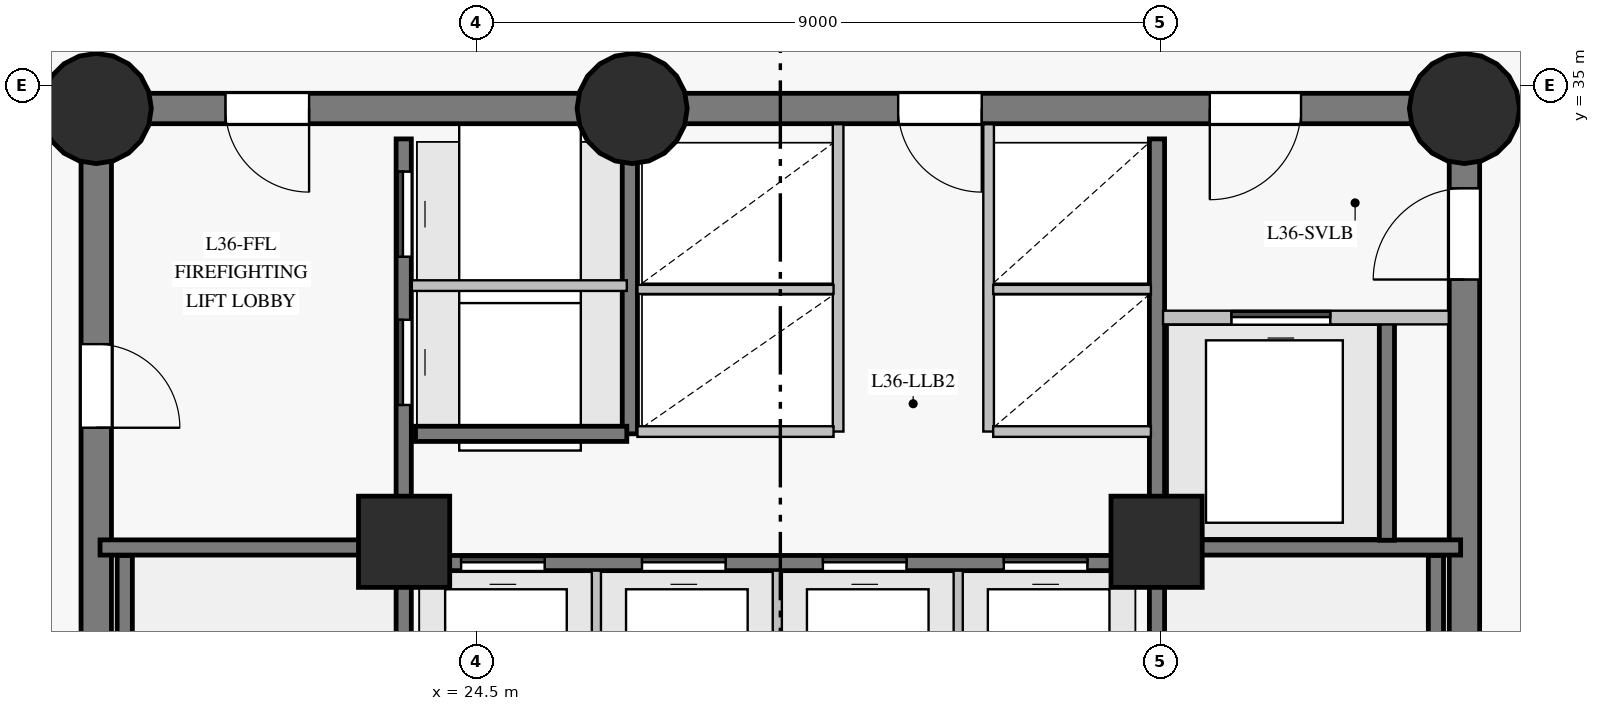
"""IFC4 building model, lengths in metres.
Left out: names, types, materials, properties, quantities, classifications, styles, units other than length and angle.
Written with IfcOpenShell. Run it as: python <this file> out.ifc"""

import sys

from ifc_helpers import new_model, si_unit, direction, frame, frame_2d, origin, origin_with_axes, origin_2d, place, context, subcontext, project, spatial, rectangle, circle, extrude, source, transform, mapped, element, fill, save


model = new_model("IFC4")
c1 = context("Model", 3, precision=1e-05, world=origin(), true_north=direction((0.0, 1.0)))
c2 = subcontext(c1, "Body", "Model", "MODEL_VIEW")
j1 = project(units=[si_unit("LENGTHUNIT", "METRE"), si_unit("PLANEANGLEUNIT", "RADIAN")], contexts=[c1])
p1 = place(None, origin())
s1 = spatial("IfcSite", under=j1, at=p1, CompositionType="ELEMENT")
p2 = place(p1, origin())
s2 = spatial("IfcBuilding", under=s1, at=p2, CompositionType="ELEMENT")
p3 = place(p2, frame((0.0, 0.0, 129.75)))
s3 = spatial("IfcBuildingStorey", under=s2, at=p3, CompositionType="ELEMENT", Elevation=129.75)
p4 = place(p3, frame((37.5, 18.3, 0.0), z_axis=(0.0, 0.0, 1.0), x_axis=(0.0, 1.0, 0.0)))
e1 = element("IfcWall", 1, at=p4, inside=s3, PredefinedType="SHEAR", context=c2, shape_type="SweptSolid", body=[
    extrude(rectangle(XDim=16.4, YDim=0.4, at=frame_2d((8.2, 0.0))), origin(), (0.0, 0.0, 1.0), 2.825),
])
p5 = place(p4, frame((14.15, 0.0, 0.0)))
e2 = element("IfcOpeningElement", 2, at=p5, cuts=e1, PredefinedType="OPENING", context=c2, shape_type="SweptSolid", body=[
    extrude(rectangle(XDim=1.2, YDim=2.15, at=frame_2d((0.6, 1.075))), frame((0.0, 0.21, 0.0), z_axis=(0.0, -1.0, 0.0), x_axis=(1.0, 0.0, 0.0)), (0.0, 0.0, 1.0), 0.42),
])
p6 = place(p3, frame((37.5, 34.7, 0.0), z_axis=(0.0, 0.0, 1.0), x_axis=(-1.0, 0.0, 0.0)))
e3 = element("IfcWall", 3, at=p6, inside=s3, PredefinedType="SHEAR", context=c2, shape_type="SweptSolid", body=[
    extrude(rectangle(XDim=10.95, YDim=0.4, at=frame_2d((5.475, 0.0))), origin(), (0.0, 0.0, 1.0), 2.825),
])
p7 = place(p6, frame((2.15, 0.0, 0.0)))
e4 = element("IfcOpeningElement", 4, at=p7, cuts=e3, PredefinedType="OPENING", context=c2, shape_type="SweptSolid", body=[
    extrude(rectangle(XDim=1.2, YDim=2.15, at=frame_2d((0.6, 1.075))), frame((0.0, 0.21, 0.0), z_axis=(0.0, -1.0, 0.0), x_axis=(1.0, 0.0, 0.0)), (0.0, 0.0, 1.0), 0.42),
])
p8 = place(p6, frame((6.35, 0.0, 0.0)))
e5 = element("IfcOpeningElement", 5, at=p8, cuts=e3, PredefinedType="OPENING", context=c2, shape_type="SweptSolid", body=[
    extrude(rectangle(XDim=1.1, YDim=2.15, at=frame_2d((0.55, 1.075))), frame((0.0, 0.21, 0.0), z_axis=(0.0, -1.0, 0.0), x_axis=(1.0, 0.0, 0.0)), (0.0, 0.0, 1.0), 0.42),
])
p9 = place(p3, frame((26.55, 34.7, 0.0), z_axis=(0.0, 0.0, 1.0), x_axis=(-1.0, 0.0, 0.0)))
e6 = element("IfcWall", 6, at=p9, inside=s3, PredefinedType="SHEAR", context=c2, shape_type="SweptSolid", body=[
    extrude(rectangle(XDim=7.05, YDim=0.4, at=frame_2d((3.525, 0.0))), origin(), (0.0, 0.0, 1.0), 2.825),
])
p10 = place(p9, frame((4.25, 0.0, 0.0)))
e7 = element("IfcOpeningElement", 7, at=p10, cuts=e6, PredefinedType="OPENING", context=c2, shape_type="SweptSolid", body=[
    extrude(rectangle(XDim=1.1, YDim=2.15, at=frame_2d((0.55, 1.075))), frame((0.0, 0.21, 0.0), z_axis=(0.0, -1.0, 0.0), x_axis=(1.0, 0.0, 0.0)), (0.0, 0.0, 1.0), 0.42),
])
p11 = place(p3, frame((19.5, 34.7, 0.0), z_axis=(0.0, 0.0, 1.0), x_axis=(0.0, -1.0, 0.0)))
e8 = element("IfcWall", 8, at=p11, inside=s3, PredefinedType="SHEAR", context=c2, shape_type="SweptSolid", body=[
    extrude(rectangle(XDim=16.4, YDim=0.4, at=frame_2d((8.2, 0.0))), origin(), (0.0, 0.0, 1.0), 2.825),
])
p12 = place(p11, frame((3.1, 0.0, 0.0)))
e9 = element("IfcOpeningElement", 9, at=p12, cuts=e8, PredefinedType="OPENING", context=c2, shape_type="SweptSolid", body=[
    extrude(rectangle(XDim=1.1, YDim=2.15, at=frame_2d((0.55, 1.075))), frame((0.0, 0.21, 0.0), z_axis=(0.0, -1.0, 0.0), x_axis=(1.0, 0.0, 0.0)), (0.0, 0.0, 1.0), 0.42),
])
m1 = source(origin_with_axes(), c2, "Body", "SweptSolid", [
    extrude(circle(Radius=0.725, at=origin_2d()), origin(), (0.0, 0.0, 1.0), 3.05),
])
for number, where, z_axis, x_axis in (
    (10, (19.5, 34.7, 0.0), (0.0, 0.0, 1.0), (1.0, 0.0, 0.0)),
    (11, (26.55, 34.7, 0.0), (0.0, 0.0, 1.0), (1.0, 0.0, 0.0)),
    (12, (37.5, 34.7, 0.0), (0.0, 0.0, 1.0), (1.0, 0.0, 0.0)),
):
    element("IfcColumn", number, at=place(p3, frame(where, z_axis=z_axis, x_axis=x_axis)), inside=s3, PredefinedType="COLUMN", context=c2, shape_type="MappedRepresentation", body=[
        mapped(m1, transform((0.0, 0.0, 0.0), scale=1.0)),
    ])
m2 = source(origin_with_axes(), c2, "Body", "SweptSolid", [
    extrude(rectangle(XDim=1.2, YDim=1.2, at=origin_2d()), origin(), (0.0, 0.0, 1.0), 3.05),
])
for number, where, z_axis, x_axis in (
    (13, (23.55, 29.0, 0.0), (0.0, 0.0, 1.0), (1.0, 0.0, 0.0)),
    (14, (33.45, 29.0, 0.0), (0.0, 0.0, 1.0), (1.0, 0.0, 0.0)),
):
    element("IfcColumn", number, at=place(p3, frame(where, z_axis=z_axis, x_axis=x_axis)), inside=s3, PredefinedType="COLUMN", context=c2, shape_type="MappedRepresentation", body=[
        mapped(m2, transform((0.0, 0.0, 0.0), scale=1.0)),
    ])
p13 = place(p3, frame((23.545, 18.7, 0.0), z_axis=(0.0, 0.0, 1.0), x_axis=(0.0, 1.0, 0.0)))
e15 = element("IfcWall", 15, at=p13, inside=s3, PredefinedType="SHEAR", context=c2, shape_type="SweptSolid", body=[
    extrude(rectangle(XDim=15.6, YDim=0.2, at=frame_2d((7.8, 0.0))), origin(), (0.0, 0.0, 1.0), 2.825),
])
p14 = place(p13, frame((2.75, 0.0, 0.0)))
e16 = element("IfcOpeningElement", 16, at=p14, cuts=e15, PredefinedType="OPENING", context=c2, shape_type="SweptSolid", body=[
    extrude(rectangle(XDim=1.15, YDim=2.15, at=frame_2d((0.575, 1.075))), frame((0.0, 0.11, 0.0), z_axis=(0.0, -1.0, 0.0), x_axis=(1.0, 0.0, 0.0)), (0.0, 0.0, 1.0), 0.22),
])
p15 = place(p13, frame((0.14, 0.0, 0.0)))
e17 = element("IfcOpeningElement", 17, at=p15, cuts=e15, PredefinedType="OPENING", context=c2, shape_type="SweptSolid", body=[
    extrude(rectangle(XDim=0.88, YDim=2.1, at=frame_2d((0.44, 1.05))), frame((0.0, 0.11, 0.0), z_axis=(0.0, -1.0, 0.0), x_axis=(1.0, 0.0, 0.0)), (0.0, 0.0, 1.0), 0.22),
])
p16 = place(p13, frame((1.36, 0.0, 0.0)))
e18 = element("IfcOpeningElement", 18, at=p16, cuts=e15, PredefinedType="OPENING", context=c2, shape_type="SweptSolid", body=[
    extrude(rectangle(XDim=0.88, YDim=2.1, at=frame_2d((0.44, 1.05))), frame((0.0, 0.11, 0.0), z_axis=(0.0, -1.0, 0.0), x_axis=(1.0, 0.0, 0.0)), (0.0, 0.0, 1.0), 0.22),
])
p17 = place(p13, frame((12.1, 0.0, 0.0)))
e19 = element("IfcOpeningElement", 19, at=p17, cuts=e15, PredefinedType="OPENING", context=c2, shape_type="SweptSolid", body=[
    extrude(rectangle(XDim=1.12, YDim=2.15, at=frame_2d((0.56, 1.075))), frame((0.0, 0.11, 0.0), z_axis=(0.0, -1.0, 0.0), x_axis=(1.0, 0.0, 0.0)), (0.0, 0.0, 1.0), 0.22),
])
p18 = place(p13, frame((14.05, 0.0, 0.0)))
e20 = element("IfcOpeningElement", 20, at=p18, cuts=e15, PredefinedType="OPENING", context=c2, shape_type="SweptSolid", body=[
    extrude(rectangle(XDim=1.12, YDim=2.15, at=frame_2d((0.56, 1.075))), frame((0.0, 0.11, 0.0), z_axis=(0.0, -1.0, 0.0), x_axis=(1.0, 0.0, 0.0)), (0.0, 0.0, 1.0), 0.22),
])
p19 = place(p3, frame((33.455, 18.7, 0.0), z_axis=(0.0, 0.0, 1.0), x_axis=(0.0, 1.0, 0.0)))
e21 = element("IfcWall", 21, at=p19, inside=s3, PredefinedType="SHEAR", context=c2, shape_type="SweptSolid", body=[
    extrude(rectangle(XDim=15.6, YDim=0.2, at=frame_2d((7.8, 0.0))), origin(), (0.0, 0.0, 1.0), 2.825),
])
p20 = place(p19, frame((2.75, 0.0, 0.0)))
e22 = element("IfcOpeningElement", 22, at=p20, cuts=e21, PredefinedType="OPENING", context=c2, shape_type="SweptSolid", body=[
    extrude(rectangle(XDim=1.15, YDim=2.15, at=frame_2d((0.575, 1.075))), frame((0.0, 0.11, 0.0), z_axis=(0.0, -1.0, 0.0), x_axis=(1.0, 0.0, 0.0)), (0.0, 0.0, 1.0), 0.22),
])
p21 = place(p19, frame((0.55, 0.0, 0.0)))
e23 = element("IfcOpeningElement", 23, at=p21, cuts=e21, PredefinedType="OPENING", context=c2, shape_type="SweptSolid", body=[
    extrude(rectangle(XDim=0.94, YDim=2.1, at=frame_2d((0.47, 1.05))), frame((0.0, 0.11, 0.0), z_axis=(0.0, -1.0, 0.0), x_axis=(1.0, 0.0, 0.0)), (0.0, 0.0, 1.0), 0.22),
])
p22 = place(p3, frame((23.7, 28.72, 0.0), z_axis=(0.0, 0.0, 1.0), x_axis=(1.0, 0.0, 0.0)))
e24 = element("IfcWall", 24, at=p22, inside=s3, PredefinedType="SHEAR", context=c2, shape_type="SweptSolid", body=[
    extrude(rectangle(XDim=9.6, YDim=0.2, at=frame_2d((4.8, 0.0))), origin(), (0.0, 0.0, 1.0), 2.825),
])
p23 = place(p22, frame((0.6, 0.0, 0.0)))
e25 = element("IfcOpeningElement", 25, at=p23, cuts=e24, PredefinedType="OPENING", context=c2, shape_type="SweptSolid", body=[
    extrude(rectangle(XDim=1.1, YDim=2.15, at=frame_2d((0.55, 1.075))), frame((0.0, 0.11, 0.0), z_axis=(0.0, -1.0, 0.0), x_axis=(1.0, 0.0, 0.0)), (0.0, 0.0, 1.0), 0.22),
])
p24 = place(p22, frame((2.98, 0.0, 0.0)))
e26 = element("IfcOpeningElement", 26, at=p24, cuts=e24, PredefinedType="OPENING", context=c2, shape_type="SweptSolid", body=[
    extrude(rectangle(XDim=1.1, YDim=2.15, at=frame_2d((0.55, 1.075))), frame((0.0, 0.11, 0.0), z_axis=(0.0, -1.0, 0.0), x_axis=(1.0, 0.0, 0.0)), (0.0, 0.0, 1.0), 0.22),
])
p25 = place(p22, frame((5.36, 0.0, 0.0)))
e27 = element("IfcOpeningElement", 27, at=p25, cuts=e24, PredefinedType="OPENING", context=c2, shape_type="SweptSolid", body=[
    extrude(rectangle(XDim=1.1, YDim=2.15, at=frame_2d((0.55, 1.075))), frame((0.0, 0.11, 0.0), z_axis=(0.0, -1.0, 0.0), x_axis=(1.0, 0.0, 0.0)), (0.0, 0.0, 1.0), 0.22),
])
p26 = place(p22, frame((7.74, 0.0, 0.0)))
e28 = element("IfcOpeningElement", 28, at=p26, cuts=e24, PredefinedType="OPENING", context=c2, shape_type="SweptSolid", body=[
    extrude(rectangle(XDim=1.1, YDim=2.15, at=frame_2d((0.55, 1.075))), frame((0.0, 0.11, 0.0), z_axis=(0.0, -1.0, 0.0), x_axis=(1.0, 0.0, 0.0)), (0.0, 0.0, 1.0), 0.22),
])
for number, where, z_axis, x_axis in (
    (29, (19.875, 21.32, 0.0), (0.0, 0.0, 1.0), (0.0, 1.0, 0.0)),
    (30, (37.125, 21.32, 0.0), (0.0, 0.0, 1.0), (0.0, 1.0, 0.0)),
):
    element("IfcWall", number, at=place(p3, frame(where, z_axis=z_axis, x_axis=x_axis)), inside=s3, PredefinedType="SHEAR", context=c2, shape_type="SweptSolid", body=[
        extrude(rectangle(XDim=7.5, YDim=0.2, at=frame_2d((3.75, 0.0))), origin(), (0.0, 0.0, 1.0), 2.825),
    ])
for number, where, z_axis, x_axis in (
    (31, (33.455, 28.925, 0.0), (0.0, 0.0, 1.0), (1.0, 0.0, 0.0)),
    (32, (19.55, 28.925, 0.0), (0.0, 0.0, 1.0), (1.0, 0.0, 0.0)),
):
    element("IfcWall", number, at=place(p3, frame(where, z_axis=z_axis, x_axis=x_axis)), inside=s3, PredefinedType="SHEAR", context=c2, shape_type="SweptSolid", body=[
        extrude(rectangle(XDim=3.995, YDim=0.2, at=frame_2d((1.998, 0.0))), origin(), (0.0, 0.0, 1.0), 2.825),
    ])
p27 = place(p3, frame((26.52, 30.42, 0.0), z_axis=(0.0, 0.0, 1.0), x_axis=(0.0, 1.0, 0.0)))
e33 = element("IfcWall", 33, at=p27, inside=s3, PredefinedType="SHEAR", context=c2, shape_type="SweptSolid", body=[
    extrude(rectangle(XDim=3.86, YDim=0.2, at=frame_2d((1.93, 0.0))), origin(), (0.0, 0.0, 1.0), 2.825),
])
p28 = place(p3, frame((36.48, 29.02, 0.0), z_axis=(0.0, 0.0, 1.0), x_axis=(0.0, 1.0, 0.0)))
e34 = element("IfcWall", 34, at=p28, inside=s3, PredefinedType="SHEAR", context=c2, shape_type="SweptSolid", body=[
    extrude(rectangle(XDim=2.86, YDim=0.2, at=frame_2d((1.43, 0.0))), origin(), (0.0, 0.0, 1.0), 2.825),
])
p29 = place(p3, frame((23.7, 30.42, 0.0), z_axis=(0.0, 0.0, 1.0), x_axis=(1.0, 0.0, 0.0)))
e35 = element("IfcWall", 35, at=p29, inside=s3, PredefinedType="SHEAR", context=c2, shape_type="SweptSolid", body=[
    extrude(rectangle(XDim=2.78, YDim=0.2, at=frame_2d((1.39, 0.0))), origin(), (0.0, 0.0, 1.0), 2.825),
])
for number, where, z_axis, x_axis in (
    (36, (29.26, 30.45, 0.0), (0.0, 0.0, 1.0), (0.0, 1.0, 0.0)),
    (37, (31.24, 30.45, 0.0), (0.0, 0.0, 1.0), (0.0, 1.0, 0.0)),
):
    element("IfcWall", number, at=place(p3, frame(where, z_axis=z_axis, x_axis=x_axis)), inside=s3, PredefinedType="PARTITIONING", context=c2, shape_type="SweptSolid", body=[
        extrude(rectangle(XDim=4.043, YDim=0.14, at=frame_2d((2.021, 0.0))), origin(), (0.0, 0.0, 1.0), 2.825),
    ])
p30 = place(p3, frame((33.535, 31.95, 0.0), z_axis=(0.0, 0.0, 1.0), x_axis=(1.0, 0.0, 0.0)))
e38 = element("IfcWall", 38, at=p30, inside=s3, PredefinedType="PARTITIONING", context=c2, shape_type="SweptSolid", body=[
    extrude(rectangle(XDim=3.759, YDim=0.18, at=frame_2d((1.879, 0.0))), origin(), (0.0, 0.0, 1.0), 2.825),
])
p31 = place(p30, frame((0.9, 0.0, 0.0)))
e39 = element("IfcOpeningElement", 39, at=p31, cuts=e38, PredefinedType="OPENING", context=c2, shape_type="SweptSolid", body=[
    extrude(rectangle(XDim=1.3, YDim=2.2, at=frame_2d((0.65, 1.1))), frame((0.0, 0.1, 0.0), z_axis=(0.0, -1.0, 0.0), x_axis=(1.0, 0.0, 0.0)), (0.0, 0.0, 1.0), 0.2),
])
p32 = place(p3, frame((23.652, 32.37, 0.0), z_axis=(0.0, 0.0, 1.0), x_axis=(1.0, 0.0, 0.0)))
e40 = element("IfcWall", 40, at=p32, inside=s3, PredefinedType="PARTITIONING", context=c2, shape_type="SweptSolid", body=[
    extrude(rectangle(XDim=2.828, YDim=0.14, at=frame_2d((1.414, 0.0))), origin(), (0.0, 0.0, 1.0), 2.825),
])
for number, where, z_axis, x_axis in (
    (41, (26.08, 26.02, 0.0), (0.0, 0.0, 1.0), (0.0, 1.0, 0.0)),
    (42, (28.46, 26.02, 0.0), (0.0, 0.0, 1.0), (0.0, 1.0, 0.0)),
    (43, (30.84, 26.02, 0.0), (0.0, 0.0, 1.0), (0.0, 1.0, 0.0)),
):
    element("IfcWall", number, at=place(p3, frame(where, z_axis=z_axis, x_axis=x_axis)), inside=s3, PredefinedType="PARTITIONING", context=c2, shape_type="SweptSolid", body=[
        extrude(rectangle(XDim=2.6, YDim=0.12, at=frame_2d((1.3, 0.0))), origin(), (0.0, 0.0, 1.0), 2.825),
    ])
p33 = place(p3, frame((26.62, 30.45, 0.0), z_axis=(0.0, 0.0, 1.0), x_axis=(1.0, 0.0, 0.0)))
e44 = element("IfcWall", 44, at=p33, inside=s3, PredefinedType="PARTITIONING", context=c2, shape_type="SweptSolid", body=[
    extrude(rectangle(XDim=2.58, YDim=0.14, at=frame_2d((1.29, 0.0))), origin(), (0.0, 0.0, 1.0), 2.825),
])
p34 = place(p3, frame((26.62, 32.32, 0.0), z_axis=(0.0, 0.0, 1.0), x_axis=(1.0, 0.0, 0.0)))
e45 = element("IfcWall", 45, at=p34, inside=s3, PredefinedType="PARTITIONING", context=c2, shape_type="SweptSolid", body=[
    extrude(rectangle(XDim=2.58, YDim=0.12, at=frame_2d((1.29, 0.0))), origin(), (0.0, 0.0, 1.0), 2.825),
])
p35 = place(p3, frame((31.3, 30.45, 0.0), z_axis=(0.0, 0.0, 1.0), x_axis=(1.0, 0.0, 0.0)))
e46 = element("IfcWall", 46, at=p35, inside=s3, PredefinedType="PARTITIONING", context=c2, shape_type="SweptSolid", body=[
    extrude(rectangle(XDim=2.075, YDim=0.14, at=frame_2d((1.038, 0.0))), origin(), (0.0, 0.0, 1.0), 2.825),
])
p36 = place(p3, frame((31.3, 32.32, 0.0), z_axis=(0.0, 0.0, 1.0), x_axis=(1.0, 0.0, 0.0)))
e47 = element("IfcWall", 47, at=p36, inside=s3, PredefinedType="PARTITIONING", context=c2, shape_type="SweptSolid", body=[
    extrude(rectangle(XDim=2.075, YDim=0.12, at=frame_2d((1.038, 0.0))), origin(), (0.0, 0.0, 1.0), 2.825),
])
m3 = source(origin_with_axes(), c2, "Body", "SweptSolid", [
    extrude(rectangle(XDim=1.1, YDim=2.15, at=frame_2d((0.55, 1.075))), frame((0.0, 0.025, 0.0), z_axis=(0.0, -1.0, 0.0), x_axis=(1.0, 0.0, 0.0)), (0.0, 0.0, 1.0), 0.05),
])
p37 = place(p10, origin())
e48 = element("IfcDoor", 48, at=p37, inside=s3, OperationType="SINGLE_SWING_LEFT", PredefinedType="DOOR", context=c2, shape_type="MappedRepresentation", body=[
    mapped(m3, transform((0.0, 0.0, 0.0), scale=1.0)),
])
fill(e7, e48)
p38 = place(p12, origin())
e49 = element("IfcDoor", 49, at=p38, inside=s3, OperationType="SINGLE_SWING_RIGHT", PredefinedType="DOOR", context=c2, shape_type="MappedRepresentation", body=[
    mapped(m3, transform((0.0, 0.0, 0.0), scale=1.0)),
])
fill(e9, e49)
m4 = source(origin_with_axes(), c2, "Body", "SweptSolid", [
    extrude(rectangle(XDim=1.2, YDim=2.15, at=frame_2d((0.6, 1.075))), frame((0.0, 0.025, 0.0), z_axis=(0.0, -1.0, 0.0), x_axis=(1.0, 0.0, 0.0)), (0.0, 0.0, 1.0), 0.05),
])
p39 = place(p5, origin())
e50 = element("IfcDoor", 50, at=p39, inside=s3, OperationType="SINGLE_SWING_LEFT", PredefinedType="DOOR", context=c2, shape_type="MappedRepresentation", body=[
    mapped(m4, transform((0.0, 0.0, 0.0), scale=1.0)),
])
fill(e2, e50)
p40 = place(p7, origin())
e51 = element("IfcDoor", 51, at=p40, inside=s3, OperationType="SINGLE_SWING_RIGHT", PredefinedType="DOOR", context=c2, shape_type="MappedRepresentation", body=[
    mapped(m4, transform((0.0, 0.0, 0.0), scale=1.0)),
])
fill(e4, e51)
m5 = source(origin_with_axes(), c2, "Body", "SweptSolid", [
    extrude(rectangle(XDim=1.3, YDim=2.2, at=frame_2d((0.65, 1.1))), frame((0.0, 0.025, 0.0), z_axis=(0.0, -1.0, 0.0), x_axis=(1.0, 0.0, 0.0)), (0.0, 0.0, 1.0), 0.05),
])
p41 = place(p31, origin())
e52 = element("IfcDoor", 52, at=p41, inside=s3, OperationType="SLIDING_TO_LEFT", PredefinedType="DOOR", context=c2, shape_type="MappedRepresentation", body=[
    mapped(m5, transform((0.0, 0.0, 0.0), scale=1.0)),
])
fill(e39, e52)
p42 = place(p23, origin())
e53 = element("IfcDoor", 53, at=p42, inside=s3, OperationType="SLIDING_TO_LEFT", PredefinedType="DOOR", context=c2, shape_type="MappedRepresentation", body=[
    mapped(m3, transform((0.0, 0.0, 0.0), scale=1.0)),
])
fill(e25, e53)
p43 = place(p24, origin())
e54 = element("IfcDoor", 54, at=p43, inside=s3, OperationType="SLIDING_TO_RIGHT", PredefinedType="DOOR", context=c2, shape_type="MappedRepresentation", body=[
    mapped(m3, transform((0.0, 0.0, 0.0), scale=1.0)),
])
fill(e26, e54)
p44 = place(p25, origin())
e55 = element("IfcDoor", 55, at=p44, inside=s3, OperationType="SLIDING_TO_LEFT", PredefinedType="DOOR", context=c2, shape_type="MappedRepresentation", body=[
    mapped(m3, transform((0.0, 0.0, 0.0), scale=1.0)),
])
fill(e27, e55)
p45 = place(p26, origin())
e56 = element("IfcDoor", 56, at=p45, inside=s3, OperationType="SLIDING_TO_RIGHT", PredefinedType="DOOR", context=c2, shape_type="MappedRepresentation", body=[
    mapped(m3, transform((0.0, 0.0, 0.0), scale=1.0)),
])
fill(e28, e56)
p46 = place(p8, origin())
e57 = element("IfcDoor", 57, at=p46, inside=s3, OperationType="SINGLE_SWING_LEFT", PredefinedType="DOOR", context=c2, shape_type="MappedRepresentation", body=[
    mapped(m3, transform((0.0, 0.0, 0.0), scale=1.0)),
])
fill(e5, e57)
m6 = source(origin_with_axes(), c2, "Body", "SweptSolid", [
    extrude(rectangle(XDim=1.12, YDim=2.15, at=frame_2d((0.56, 1.075))), frame((0.0, 0.025, 0.0), z_axis=(0.0, -1.0, 0.0), x_axis=(1.0, 0.0, 0.0)), (0.0, 0.0, 1.0), 0.05),
])
p47 = place(p17, origin())
e58 = element("IfcDoor", 58, at=p47, inside=s3, OperationType="SLIDING_TO_LEFT", PredefinedType="DOOR", context=c2, shape_type="MappedRepresentation", body=[
    mapped(m6, transform((0.0, 0.0, 0.0), scale=1.0)),
])
fill(e19, e58)
p48 = place(p18, origin())
e59 = element("IfcDoor", 59, at=p48, inside=s3, OperationType="SLIDING_TO_RIGHT", PredefinedType="DOOR", context=c2, shape_type="MappedRepresentation", body=[
    mapped(m6, transform((0.0, 0.0, 0.0), scale=1.0)),
])
fill(e20, e59)
save(model, sys.argv[1])
